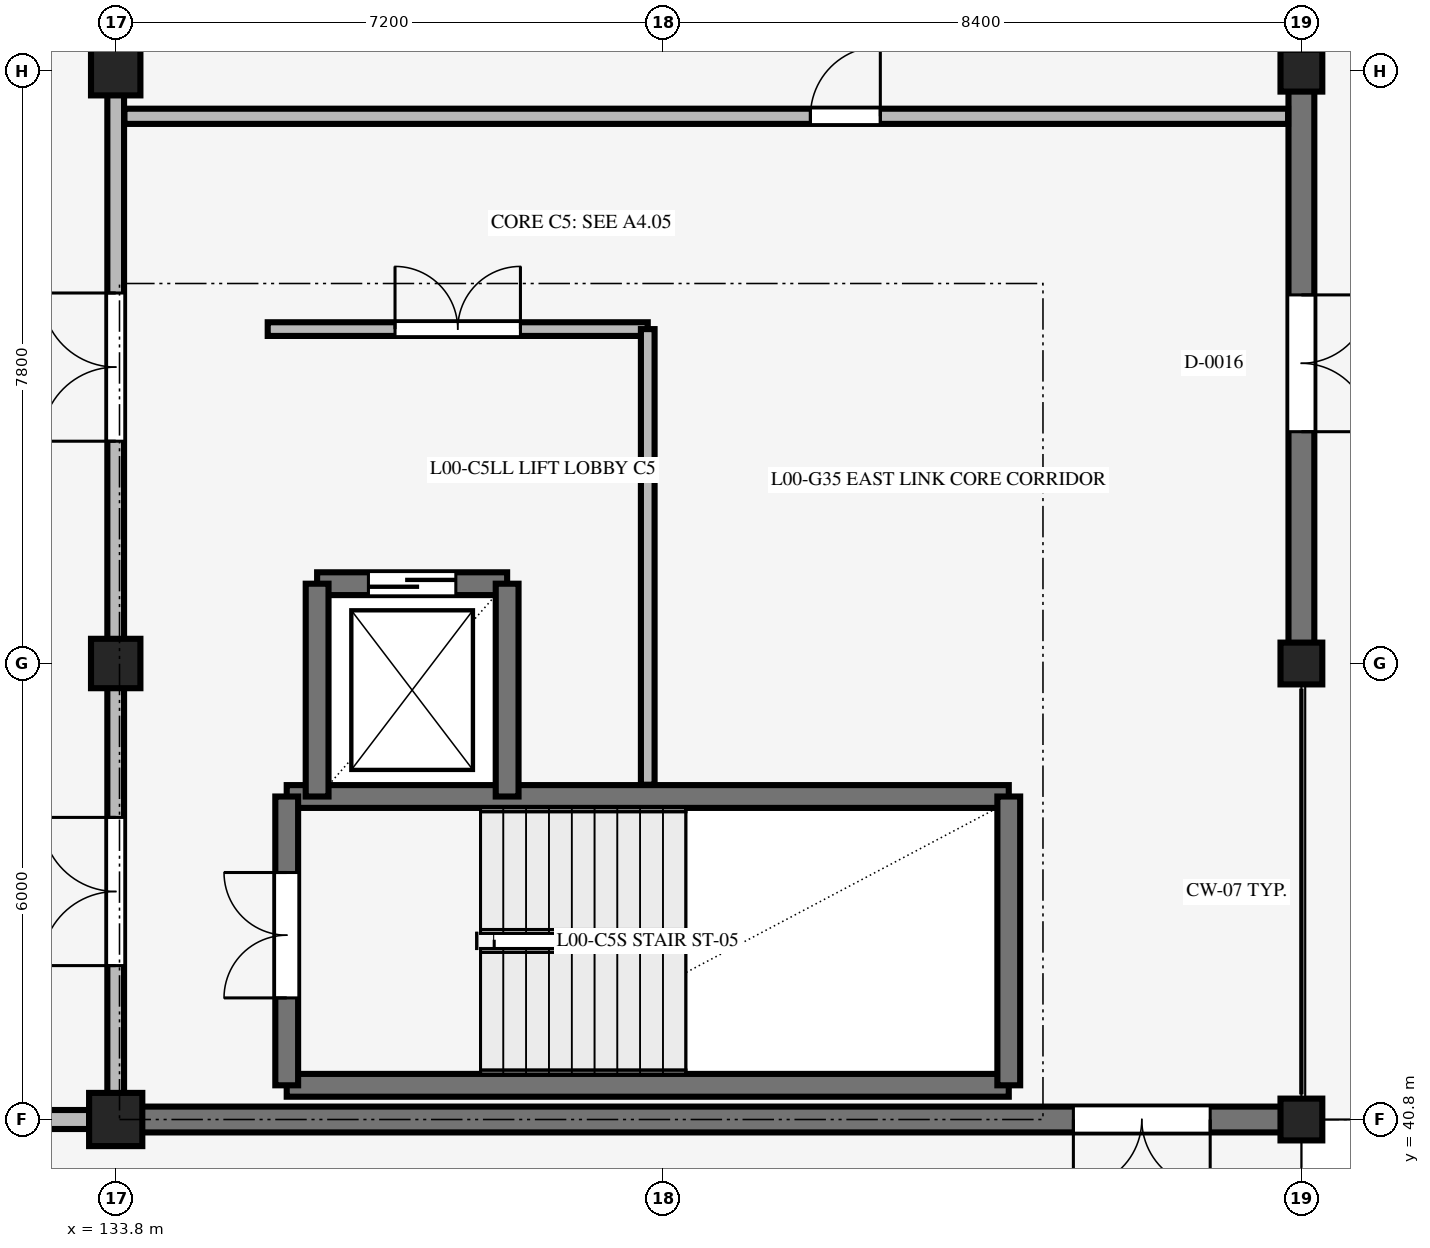
"""IFC4 building model, lengths in metres.
Left out: names, types, materials, properties, quantities, classifications, styles, units other than length and angle.
Written with IfcOpenShell. Run it as: python <this file> out.ifc"""

import sys

from ifc_helpers import new_model, si_unit, direction, frame, frame_2d, origin, origin_2d, place, context, subcontext, project, spatial, rectangle, extrude, element, fill, save


model = new_model("IFC4")
c1 = context("Model", 3, precision=1e-05, world=origin(), true_north=direction((0.0, 1.0)))
c2 = subcontext(c1, "Body", "Model", "MODEL_VIEW")
j1 = project(units=[si_unit("LENGTHUNIT", "METRE"), si_unit("PLANEANGLEUNIT", "RADIAN")], contexts=[c1])
p1 = place(None, origin())
s1 = spatial("IfcSite", under=j1, at=p1, CompositionType="ELEMENT")
p2 = place(p1, origin())
s2 = spatial("IfcBuilding", under=s1, at=p2, CompositionType="ELEMENT")
p3 = place(p2, origin())
s3 = spatial("IfcBuildingStorey", under=s2, at=p3, CompositionType="ELEMENT", Elevation=0.0)
p4 = place(p3, frame((133.8, 40.8, 0.0), z_axis=(0.0, 0.0, 1.0), x_axis=(1.0, 0.0, 0.0)))
e1 = element("IfcColumn", 1, at=p4, inside=s3, PredefinedType="COLUMN", context=c2, shape_type="SweptSolid", body=[
    extrude(rectangle(XDim=0.7, YDim=0.7, at=origin_2d()), origin(), (0.0, 0.0, 1.0), 6.0),
])
for number, where, z_axis, x_axis in (
    (2, (133.8, 46.8, 0.0), (0.0, 0.0, 1.0), (1.0, 0.0, 0.0)),
    (3, (133.8, 54.6, 0.0), (0.0, 0.0, 1.0), (1.0, 0.0, 0.0)),
):
    element("IfcColumn", number, at=place(p3, frame(where, z_axis=z_axis, x_axis=x_axis)), inside=s3, PredefinedType="COLUMN", context=c2, shape_type="SweptSolid", body=[
        extrude(rectangle(XDim=0.65, YDim=0.65, at=origin_2d()), origin(), (0.0, 0.0, 1.0), 6.0),
    ])
for number, where, z_axis, x_axis in (
    (4, (149.4, 40.8, 0.0), (0.0, 0.0, 1.0), (1.0, 0.0, 0.0)),
    (5, (149.4, 46.8, 0.0), (0.0, 0.0, 1.0), (1.0, 0.0, 0.0)),
    (6, (149.4, 54.6, 0.0), (0.0, 0.0, 1.0), (1.0, 0.0, 0.0)),
):
    element("IfcColumn", number, at=place(p3, frame(where, z_axis=z_axis, x_axis=x_axis)), inside=s3, PredefinedType="COLUMN", context=c2, shape_type="SweptSolid", body=[
        extrude(rectangle(XDim=0.55, YDim=0.55, at=origin_2d()), origin(), (0.0, 0.0, 1.0), 6.0),
    ])
for number, where, z_axis, x_axis in (
    (7, (145.55, 41.25, 0.0), (0.0, 0.0, 1.0), (-1.0, 0.0, 0.0)),
    (8, (136.05, 45.05, 0.0), (0.0, 0.0, 1.0), (1.0, 0.0, 0.0)),
):
    element("IfcWall", number, at=place(p3, frame(where, z_axis=z_axis, x_axis=x_axis)), inside=s3, PredefinedType="SHEAR", context=c2, shape_type="SweptSolid", body=[
        extrude(rectangle(XDim=9.5, YDim=0.3, at=frame_2d((4.75, 0.0))), origin(), (0.0, 0.0, 1.0), 6.0),
    ])
p5 = place(p3, frame((136.05, 41.25, 0.0), z_axis=(0.0, 0.0, 1.0), x_axis=(0.0, 1.0, 0.0)))
e9 = element("IfcWall", 9, at=p5, inside=s3, PredefinedType="SHEAR", context=c2, shape_type="SweptSolid", body=[
    extrude(rectangle(XDim=3.8, YDim=0.3, at=frame_2d((1.9, 0.0))), origin(), (0.0, 0.0, 1.0), 6.0),
])
p6 = place(p5, frame((1.15, 0.0, 0.0)))
e10 = element("IfcOpeningElement", 10, at=p6, cuts=e9, PredefinedType="OPENING", context=c2, shape_type="SweptSolid", body=[
    extrude(rectangle(XDim=1.65, YDim=2.2, at=frame_2d((0.825, 1.1))), frame((0.0, 0.16, 0.0), z_axis=(0.0, -1.0, 0.0), x_axis=(1.0, 0.0, 0.0)), (0.0, 0.0, 1.0), 0.32),
])
p7 = place(p3, frame((145.55, 41.25, 0.0), z_axis=(0.0, 0.0, 1.0), x_axis=(0.0, 1.0, 0.0)))
e11 = element("IfcWall", 11, at=p7, inside=s3, PredefinedType="SHEAR", context=c2, shape_type="SweptSolid", body=[
    extrude(rectangle(XDim=3.8, YDim=0.3, at=frame_2d((1.9, 0.0))), origin(), (0.0, 0.0, 1.0), 6.0),
])
p8 = place(p3, frame((136.45, 47.85, 0.0), z_axis=(0.0, 0.0, 1.0), x_axis=(1.0, 0.0, 0.0)))
e12 = element("IfcWall", 12, at=p8, inside=s3, PredefinedType="SHEAR", context=c2, shape_type="SweptSolid", body=[
    extrude(rectangle(XDim=2.5, YDim=0.3, at=frame_2d((1.25, 0.0))), origin(), (0.0, 0.0, 1.0), 5.66),
])
p9 = place(p8, frame((0.675, 0.0, 0.0)))
e13 = element("IfcOpeningElement", 13, at=p9, cuts=e12, PredefinedType="OPENING", context=c2, shape_type="SweptSolid", body=[
    extrude(rectangle(XDim=1.15, YDim=2.2, at=frame_2d((0.575, 1.1))), frame((0.0, 0.16, 0.0), z_axis=(0.0, -1.0, 0.0), x_axis=(1.0, 0.0, 0.0)), (0.0, 0.0, 1.0), 0.32),
])
for number, where, z_axis, x_axis in (
    (14, (136.45, 45.05, 0.0), (0.0, 0.0, 1.0), (0.0, 1.0, 0.0)),
    (15, (138.95, 45.05, 0.0), (0.0, 0.0, 1.0), (0.0, 1.0, 0.0)),
):
    element("IfcWall", number, at=place(p3, frame(where, z_axis=z_axis, x_axis=x_axis)), inside=s3, PredefinedType="SHEAR", context=c2, shape_type="SweptSolid", body=[
        extrude(rectangle(XDim=2.8, YDim=0.3, at=frame_2d((1.4, 0.0))), origin(), (0.0, 0.0, 1.0), 5.66),
    ])
p10 = place(p3, frame((133.45, 40.8, 0.0), z_axis=(0.0, 0.0, 1.0), x_axis=(-1.0, 0.0, 0.0)))
e16 = element("IfcWall", 16, at=p10, inside=s3, PredefinedType="STANDARD", context=c2, shape_type="SweptSolid", body=[
    extrude(rectangle(XDim=8.3, YDim=0.25, at=frame_2d((4.15, 0.0))), origin(), (0.0, 0.0, 1.0), 5.19),
])
p11 = place(p10, frame((3.15, 0.0, 0.0)))
e17 = element("IfcOpeningElement", 17, at=p11, cuts=e16, PredefinedType="OPENING", context=c2, shape_type="SweptSolid", body=[
    extrude(rectangle(XDim=1.9, YDim=2.3, at=frame_2d((0.95, 1.15))), frame((0.0, 0.135, 0.0), z_axis=(0.0, -1.0, 0.0), x_axis=(1.0, 0.0, 0.0)), (0.0, 0.0, 1.0), 0.27),
])
p12 = place(p10, frame((0.65, 0.0, 0.45)))
e18 = element("IfcOpeningElement", 18, at=p12, cuts=e16, PredefinedType="OPENING", context=c2, shape_type="SweptSolid", body=[
    extrude(rectangle(XDim=1.8, YDim=1.8, at=frame_2d((0.9, 0.9))), frame((0.0, 0.135, 0.0), z_axis=(0.0, -1.0, 0.0), x_axis=(1.0, 0.0, 0.0)), (0.0, 0.0, 1.0), 0.27),
])
p13 = place(p10, frame((5.65, 0.0, 0.45)))
e19 = element("IfcOpeningElement", 19, at=p13, cuts=e16, PredefinedType="OPENING", context=c2, shape_type="SweptSolid", body=[
    extrude(rectangle(XDim=1.8, YDim=1.8, at=frame_2d((0.9, 0.9))), frame((0.0, 0.135, 0.0), z_axis=(0.0, -1.0, 0.0), x_axis=(1.0, 0.0, 0.0)), (0.0, 0.0, 1.0), 0.27),
])
p14 = place(p3, frame((149.4, 40.8, 0.0), z_axis=(0.0, 0.0, 1.0), x_axis=(-1.0, 0.0, 0.0)))
e20 = element("IfcWall", 20, at=p14, inside=s3, PredefinedType="STANDARD", context=c2, shape_type="SweptSolid", body=[
    extrude(rectangle(XDim=15.945, YDim=0.34, at=frame_2d((7.972, 0.0))), origin(), (0.0, 0.0, 1.0), 11.69),
])
p15 = place(p14, frame((1.2, 0.0, 0.0)))
e21 = element("IfcOpeningElement", 21, at=p15, cuts=e20, PredefinedType="OPENING", context=c2, shape_type="SweptSolid", body=[
    extrude(rectangle(XDim=1.8, YDim=2.25, at=frame_2d((0.9, 1.125))), frame((0.0, 0.18, 0.0), z_axis=(0.0, -1.0, 0.0), x_axis=(1.0, 0.0, 0.0)), (0.0, 0.0, 1.0), 0.36),
])
p16 = place(p3, frame((149.4, 54.335, 0.0), z_axis=(0.0, 0.0, 1.0), x_axis=(0.0, -1.0, 0.0)))
e22 = element("IfcWall", 22, at=p16, inside=s3, PredefinedType="STANDARD", context=c2, shape_type="SweptSolid", body=[
    extrude(rectangle(XDim=7.27, YDim=0.34, at=frame_2d((3.635, 0.0))), origin(), (0.0, 0.0, 1.0), 5.76),
])
p17 = place(p16, frame((2.685, 0.0, 0.0)))
e23 = element("IfcOpeningElement", 23, at=p17, cuts=e22, PredefinedType="OPENING", context=c2, shape_type="SweptSolid", body=[
    extrude(rectangle(XDim=1.8, YDim=2.25, at=frame_2d((0.9, 1.125))), frame((0.0, 0.18, 0.0), z_axis=(0.0, -1.0, 0.0), x_axis=(1.0, 0.0, 0.0)), (0.0, 0.0, 1.0), 0.36),
])
p18 = place(p3, frame((133.8, 40.975, 0.0), z_axis=(0.0, 0.0, 1.0), x_axis=(0.0, 1.0, 0.0)))
e24 = element("IfcWall", 24, at=p18, inside=s3, PredefinedType="STANDARD", context=c2, shape_type="SweptSolid", body=[
    extrude(rectangle(XDim=5.525, YDim=0.22, at=frame_2d((2.762, 0.0))), origin(), (0.0, 0.0, 1.0), 3.05),
])
p19 = place(p18, frame((1.85, 0.0, 0.0)))
e25 = element("IfcOpeningElement", 25, at=p19, cuts=e24, PredefinedType="OPENING", context=c2, shape_type="SweptSolid", body=[
    extrude(rectangle(XDim=1.95, YDim=2.35, at=frame_2d((0.975, 1.175))), frame((0.0, 0.12, 0.0), z_axis=(0.0, -1.0, 0.0), x_axis=(1.0, 0.0, 0.0)), (0.0, 0.0, 1.0), 0.24),
])
p20 = place(p3, frame((133.8, 47.1, 0.0), z_axis=(0.0, 0.0, 1.0), x_axis=(0.0, 1.0, 0.0)))
e26 = element("IfcWall", 26, at=p20, inside=s3, PredefinedType="STANDARD", context=c2, shape_type="SweptSolid", body=[
    extrude(rectangle(XDim=7.2, YDim=0.22, at=frame_2d((3.6, 0.0))), origin(), (0.0, 0.0, 1.0), 3.05),
])
p21 = place(p20, frame((2.625, 0.0, 0.0)))
e27 = element("IfcOpeningElement", 27, at=p21, cuts=e26, PredefinedType="OPENING", context=c2, shape_type="SweptSolid", body=[
    extrude(rectangle(XDim=1.95, YDim=2.35, at=frame_2d((0.975, 1.175))), frame((0.0, 0.12, 0.0), z_axis=(0.0, -1.0, 0.0), x_axis=(1.0, 0.0, 0.0)), (0.0, 0.0, 1.0), 0.24),
])
p22 = place(p3, frame((133.915, 54.0, 0.0), z_axis=(0.0, 0.0, 1.0), x_axis=(1.0, 0.0, 0.0)))
e28 = element("IfcWall", 28, at=p22, inside=s3, PredefinedType="STANDARD", context=c2, shape_type="SweptSolid", body=[
    extrude(rectangle(XDim=15.31, YDim=0.2, at=frame_2d((7.655, 0.0))), origin(), (0.0, 0.0, 1.0), 3.05),
])
p23 = place(p22, frame((9.025, 0.0, 0.0)))
e29 = element("IfcOpeningElement", 29, at=p23, cuts=e28, PredefinedType="OPENING", context=c2, shape_type="SweptSolid", body=[
    extrude(rectangle(XDim=0.92, YDim=2.15, at=frame_2d((0.46, 1.075))), frame((0.0, 0.11, 0.0), z_axis=(0.0, -1.0, 0.0), x_axis=(1.0, 0.0, 0.0)), (0.0, 0.0, 1.0), 0.22),
])
p24 = place(p3, frame((135.8, 51.2, 0.0), z_axis=(0.0, 0.0, 1.0), x_axis=(1.0, 0.0, 0.0)))
e30 = element("IfcWall", 30, at=p24, inside=s3, PredefinedType="STANDARD", context=c2, shape_type="SweptSolid", body=[
    extrude(rectangle(XDim=5.0, YDim=0.18, at=frame_2d((2.5, 0.0))), origin(), (0.0, 0.0, 1.0), 3.05),
])
p25 = place(p24, frame((1.675, 0.0, 0.0)))
e31 = element("IfcOpeningElement", 31, at=p25, cuts=e30, PredefinedType="OPENING", context=c2, shape_type="SweptSolid", body=[
    extrude(rectangle(XDim=1.65, YDim=2.2, at=frame_2d((0.825, 1.1))), frame((0.0, 0.1, 0.0), z_axis=(0.0, -1.0, 0.0), x_axis=(1.0, 0.0, 0.0)), (0.0, 0.0, 1.0), 0.2),
])
p26 = place(p3, frame((140.8, 45.205, 0.0), z_axis=(0.0, 0.0, 1.0), x_axis=(0.0, 1.0, 0.0)))
e32 = element("IfcWall", 32, at=p26, inside=s3, PredefinedType="STANDARD", context=c2, shape_type="SweptSolid", body=[
    extrude(rectangle(XDim=5.995, YDim=0.18, at=frame_2d((2.998, 0.0))), origin(), (0.0, 0.0, 1.0), 3.05),
])
p27 = place(p15, origin())
e33 = element("IfcDoor", 33, at=p27, inside=s3, OperationType="DOUBLE_DOOR_SINGLE_SWING", PredefinedType="DOOR", context=c2, shape_type="SweptSolid", body=[
    extrude(rectangle(XDim=1.8, YDim=2.25, at=frame_2d((0.9, 1.125))), frame((0.0, 0.025, 0.0), z_axis=(0.0, -1.0, 0.0), x_axis=(1.0, 0.0, 0.0)), (0.0, 0.0, 1.0), 0.05),
])
fill(e21, e33)
p28 = place(p17, origin())
e34 = element("IfcDoor", 34, at=p28, inside=s3, OperationType="DOUBLE_DOOR_SINGLE_SWING", PredefinedType="DOOR", context=c2, shape_type="SweptSolid", body=[
    extrude(rectangle(XDim=1.8, YDim=2.25, at=frame_2d((0.9, 1.125))), frame((0.0, 0.025, 0.0), z_axis=(0.0, -1.0, 0.0), x_axis=(1.0, 0.0, 0.0)), (0.0, 0.0, 1.0), 0.05),
])
fill(e23, e34)
p29 = place(p6, origin())
e35 = element("IfcDoor", 35, at=p29, inside=s3, OperationType="DOUBLE_DOOR_SINGLE_SWING", PredefinedType="DOOR", context=c2, shape_type="SweptSolid", body=[
    extrude(rectangle(XDim=1.65, YDim=2.2, at=frame_2d((0.825, 1.1))), frame((0.0, 0.025, 0.0), z_axis=(0.0, -1.0, 0.0), x_axis=(1.0, 0.0, 0.0)), (0.0, 0.0, 1.0), 0.05),
])
fill(e10, e35)
p30 = place(p9, origin())
e36 = element("IfcDoor", 36, at=p30, inside=s3, OperationType="DOUBLE_DOOR_SLIDING", PredefinedType="DOOR", context=c2, shape_type="SweptSolid", body=[
    extrude(rectangle(XDim=1.15, YDim=2.2, at=frame_2d((0.575, 1.1))), frame((0.0, 0.025, 0.0), z_axis=(0.0, -1.0, 0.0), x_axis=(1.0, 0.0, 0.0)), (0.0, 0.0, 1.0), 0.05),
])
fill(e13, e36)
p31 = place(p19, origin())
e37 = element("IfcDoor", 37, at=p31, inside=s3, OperationType="DOUBLE_DOOR_SINGLE_SWING", PredefinedType="DOOR", context=c2, shape_type="SweptSolid", body=[
    extrude(rectangle(XDim=1.95, YDim=2.35, at=frame_2d((0.975, 1.175))), frame((0.0, 0.025, 0.0), z_axis=(0.0, -1.0, 0.0), x_axis=(1.0, 0.0, 0.0)), (0.0, 0.0, 1.0), 0.05),
])
fill(e25, e37)
p32 = place(p21, origin())
e38 = element("IfcDoor", 38, at=p32, inside=s3, OperationType="DOUBLE_DOOR_SINGLE_SWING", PredefinedType="DOOR", context=c2, shape_type="SweptSolid", body=[
    extrude(rectangle(XDim=1.95, YDim=2.35, at=frame_2d((0.975, 1.175))), frame((0.0, 0.025, 0.0), z_axis=(0.0, -1.0, 0.0), x_axis=(1.0, 0.0, 0.0)), (0.0, 0.0, 1.0), 0.05),
])
fill(e27, e38)
p33 = place(p23, origin())
e39 = element("IfcDoor", 39, at=p33, inside=s3, OperationType="SINGLE_SWING_RIGHT", PredefinedType="DOOR", context=c2, shape_type="SweptSolid", body=[
    extrude(rectangle(XDim=0.92, YDim=2.15, at=frame_2d((0.46, 1.075))), frame((0.0, 0.025, 0.0), z_axis=(0.0, -1.0, 0.0), x_axis=(1.0, 0.0, 0.0)), (0.0, 0.0, 1.0), 0.05),
])
fill(e29, e39)
p34 = place(p25, origin())
e40 = element("IfcDoor", 40, at=p34, inside=s3, OperationType="DOUBLE_DOOR_SINGLE_SWING", PredefinedType="DOOR", context=c2, shape_type="SweptSolid", body=[
    extrude(rectangle(XDim=1.65, YDim=2.2, at=frame_2d((0.825, 1.1))), frame((0.0, 0.025, 0.0), z_axis=(0.0, -1.0, 0.0), x_axis=(1.0, 0.0, 0.0)), (0.0, 0.0, 1.0), 0.05),
])
fill(e31, e40)
save(model, sys.argv[1])
